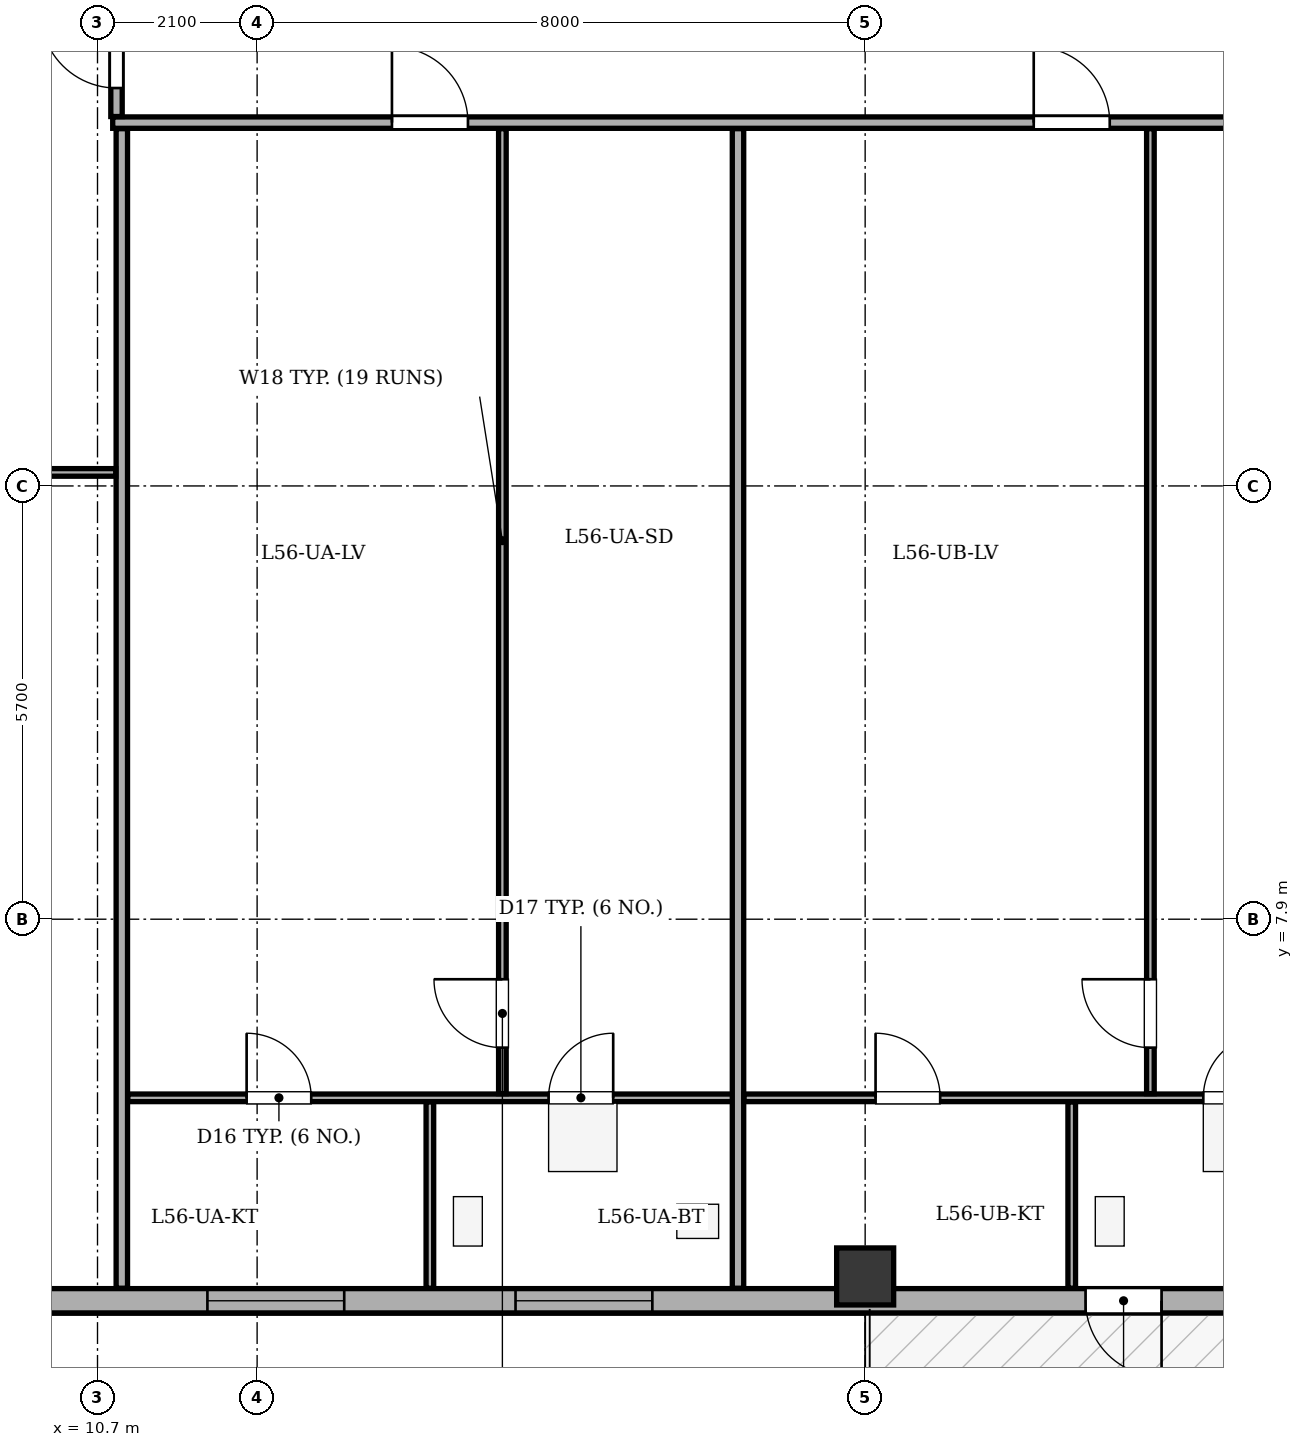
"""IFC4 building model, lengths in metres.
Left out: names, types, materials, properties, quantities, classifications, styles, units other than length and angle.
Written with IfcOpenShell. Run it as: python <this file> out.ifc"""

import sys

from ifc_helpers import new_model, si_unit, direction, frame, frame_2d, origin, origin_2d, place, context, subcontext, project, spatial, rectangle, extrude, element, fill, save


model = new_model("IFC4")
c1 = context("Model", 3, precision=1e-05, world=origin(), true_north=direction((0.0, 1.0)))
c2 = subcontext(c1, "Body", "Model", "MODEL_VIEW")
j1 = project(units=[si_unit("LENGTHUNIT", "METRE"), si_unit("PLANEANGLEUNIT", "RADIAN")], contexts=[c1])
p1 = place(None, origin())
s1 = spatial("IfcSite", under=j1, at=p1, CompositionType="ELEMENT")
p2 = place(p1, origin())
s2 = spatial("IfcBuilding", under=s1, at=p2, CompositionType="ELEMENT")
p3 = place(p2, frame((0.0, 0.0, 217.7)))
s3 = spatial("IfcBuildingStorey", under=s2, at=p3, CompositionType="ELEMENT", Elevation=217.7)
p4 = place(p3, frame((20.8, 3.2, 0.0), z_axis=(0.0, 0.0, 1.0), x_axis=(1.0, 0.0, 0.0)))
e1 = element("IfcColumn", 1, at=p4, inside=s3, PredefinedType="COLUMN", context=c2, shape_type="SweptSolid", body=[
    extrude(rectangle(XDim=0.75, YDim=0.75, at=origin_2d()), origin(), (0.0, 0.0, 1.0), 3.4),
])
p5 = place(p3, frame((44.8, 2.88, 0.0), z_axis=(0.0, 0.0, 1.0), x_axis=(-1.0, 0.0, 0.0)))
e2 = element("IfcWall", 2, at=p5, inside=s3, PredefinedType="STANDARD", context=c2, shape_type="SweptSolid", body=[
    extrude(rectangle(XDim=36.0, YDim=0.32, at=frame_2d((18.0, 0.0))), origin(), (0.0, 0.0, 1.0), 2.725),
])
p6 = place(p5, frame((20.1, 0.0, 0.0)))
e3 = element("IfcOpeningElement", 3, at=p6, cuts=e2, PredefinedType="OPENING", context=c2, shape_type="SweptSolid", body=[
    extrude(rectangle(XDim=1.0, YDim=2.02, at=frame_2d((0.5, 1.01))), frame((0.0, 0.17, 0.0), z_axis=(0.0, -1.0, 0.0), x_axis=(1.0, 0.0, 0.0)), (0.0, 0.0, 1.0), 0.34),
])
p7 = place(p5, frame((1.227, 0.0, 0.75)))
e4 = element("IfcOpeningElement", 4, at=p7, cuts=e2, PredefinedType="OPENING", context=c2, shape_type="SweptSolid", body=[
    extrude(rectangle(XDim=1.8, YDim=1.7, at=frame_2d((0.9, 0.85))), frame((0.0, 0.17, 0.0), z_axis=(0.0, -1.0, 0.0), x_axis=(1.0, 0.0, 0.0)), (0.0, 0.0, 1.0), 0.34),
])
p8 = place(p5, frame((5.18, 0.0, 0.75)))
e5 = element("IfcOpeningElement", 5, at=p8, cuts=e2, PredefinedType="OPENING", context=c2, shape_type="SweptSolid", body=[
    extrude(rectangle(XDim=1.8, YDim=1.7, at=frame_2d((0.9, 0.85))), frame((0.0, 0.17, 0.0), z_axis=(0.0, -1.0, 0.0), x_axis=(1.0, 0.0, 0.0)), (0.0, 0.0, 1.0), 0.34),
])
p9 = place(p5, frame((12.548, 0.0, 0.75)))
e6 = element("IfcOpeningElement", 6, at=p9, cuts=e2, PredefinedType="OPENING", context=c2, shape_type="SweptSolid", body=[
    extrude(rectangle(XDim=1.25, YDim=1.7, at=frame_2d((0.625, 0.85))), frame((0.0, 0.17, 0.0), z_axis=(0.0, -1.0, 0.0), x_axis=(1.0, 0.0, 0.0)), (0.0, 0.0, 1.0), 0.34),
])
p10 = place(p5, frame((26.8, 0.0, 0.75)))
e7 = element("IfcOpeningElement", 7, at=p10, cuts=e2, PredefinedType="OPENING", context=c2, shape_type="SweptSolid", body=[
    extrude(rectangle(XDim=1.8, YDim=1.7, at=frame_2d((0.9, 0.85))), frame((0.0, 0.17, 0.0), z_axis=(0.0, -1.0, 0.0), x_axis=(1.0, 0.0, 0.0)), (0.0, 0.0, 1.0), 0.34),
])
p11 = place(p5, frame((30.854, 0.0, 0.75)))
e8 = element("IfcOpeningElement", 8, at=p11, cuts=e2, PredefinedType="OPENING", context=c2, shape_type="SweptSolid", body=[
    extrude(rectangle(XDim=1.8, YDim=1.7, at=frame_2d((0.9, 0.85))), frame((0.0, 0.17, 0.0), z_axis=(0.0, -1.0, 0.0), x_axis=(1.0, 0.0, 0.0)), (0.0, 0.0, 1.0), 0.34),
])
p12 = place(p5, frame((10.33, 0.0, 0.75)))
e9 = element("IfcOpeningElement", 9, at=p12, cuts=e2, PredefinedType="OPENING", context=c2, shape_type="SweptSolid", body=[
    extrude(rectangle(XDim=0.75, YDim=1.45, at=frame_2d((0.375, 0.725))), frame((0.0, 0.17, 0.0), z_axis=(0.0, -1.0, 0.0), x_axis=(1.0, 0.0, 0.0)), (0.0, 0.0, 1.0), 0.34),
])
p13 = place(p3, frame((10.9, 18.38, 0.0), z_axis=(0.0, 0.0, 1.0), x_axis=(1.0, 0.0, 0.0)))
e10 = element("IfcWall", 10, at=p13, inside=s3, PredefinedType="PARTITIONING", context=c2, shape_type="SweptSolid", body=[
    extrude(rectangle(XDim=34.02, YDim=0.15, at=frame_2d((17.01, 0.0))), origin(), (0.0, 0.0, 1.0), 3.1),
])
p14 = place(p13, frame((3.674, 0.0, 0.0)))
e11 = element("IfcOpeningElement", 11, at=p14, cuts=e10, PredefinedType="OPENING", context=c2, shape_type="SweptSolid", body=[
    extrude(rectangle(XDim=1.0, YDim=2.1, at=frame_2d((0.5, 1.05))), frame((0.0, 0.085, 0.0), z_axis=(0.0, -1.0, 0.0), x_axis=(1.0, 0.0, 0.0)), (0.0, 0.0, 1.0), 0.17),
])
p15 = place(p13, frame((12.118, 0.0, 0.0)))
e12 = element("IfcOpeningElement", 12, at=p15, cuts=e10, PredefinedType="OPENING", context=c2, shape_type="SweptSolid", body=[
    extrude(rectangle(XDim=1.0, YDim=2.1, at=frame_2d((0.5, 1.05))), frame((0.0, 0.085, 0.0), z_axis=(0.0, -1.0, 0.0), x_axis=(1.0, 0.0, 0.0)), (0.0, 0.0, 1.0), 0.17),
])
p16 = place(p13, frame((20.901, 0.0, 0.0)))
e13 = element("IfcOpeningElement", 13, at=p16, cuts=e10, PredefinedType="OPENING", context=c2, shape_type="SweptSolid", body=[
    extrude(rectangle(XDim=1.0, YDim=2.1, at=frame_2d((0.5, 1.05))), frame((0.0, 0.085, 0.0), z_axis=(0.0, -1.0, 0.0), x_axis=(1.0, 0.0, 0.0)), (0.0, 0.0, 1.0), 0.17),
])
p17 = place(p13, frame((29.346, 0.0, 0.0)))
e14 = element("IfcOpeningElement", 14, at=p17, cuts=e10, PredefinedType="OPENING", context=c2, shape_type="SweptSolid", body=[
    extrude(rectangle(XDim=1.0, YDim=2.1, at=frame_2d((0.5, 1.05))), frame((0.0, 0.085, 0.0), z_axis=(0.0, -1.0, 0.0), x_axis=(1.0, 0.0, 0.0)), (0.0, 0.0, 1.0), 0.17),
])
p18 = place(p3, frame((11.02, 3.045, 0.0), z_axis=(0.0, 0.0, 1.0), x_axis=(0.0, 1.0, 0.0)))
e15 = element("IfcWall", 15, at=p18, inside=s3, PredefinedType="PARTITIONING", context=c2, shape_type="SweptSolid", body=[
    extrude(rectangle(XDim=15.255, YDim=0.15, at=frame_2d((7.627, 0.0))), origin(), (0.0, 0.0, 1.0), 3.1),
])
p19 = place(p3, frame((11.1, 5.55, 0.0), z_axis=(0.0, 0.0, 1.0), x_axis=(1.0, 0.0, 0.0)))
e16 = element("IfcWall", 16, at=p19, inside=s3, PredefinedType="PARTITIONING", context=c2, shape_type="SweptSolid", body=[
    extrude(rectangle(XDim=8.067, YDim=0.1, at=frame_2d((4.033, 0.0))), origin(), (0.0, 0.0, 1.0), 3.1),
])
p20 = place(p19, frame((1.562, 0.0, 0.0)))
e17 = element("IfcOpeningElement", 17, at=p20, cuts=e16, PredefinedType="OPENING", context=c2, shape_type="SweptSolid", body=[
    extrude(rectangle(XDim=0.85, YDim=2.05, at=frame_2d((0.425, 1.025))), frame((0.0, 0.06, 0.0), z_axis=(0.0, -1.0, 0.0), x_axis=(1.0, 0.0, 0.0)), (0.0, 0.0, 1.0), 0.12),
])
p21 = place(p19, frame((5.535, 0.0, 0.0)))
e18 = element("IfcOpeningElement", 18, at=p21, cuts=e16, PredefinedType="OPENING", context=c2, shape_type="SweptSolid", body=[
    extrude(rectangle(XDim=0.85, YDim=2.05, at=frame_2d((0.425, 1.025))), frame((0.0, 0.06, 0.0), z_axis=(0.0, -1.0, 0.0), x_axis=(1.0, 0.0, 0.0)), (0.0, 0.0, 1.0), 0.12),
])
p22 = place(p3, frame((16.027, 5.605, 0.0), z_axis=(0.0, 0.0, 1.0), x_axis=(0.0, 1.0, 0.0)))
e19 = element("IfcWall", 19, at=p22, inside=s3, PredefinedType="PARTITIONING", context=c2, shape_type="SweptSolid", body=[
    extrude(rectangle(XDim=12.695, YDim=0.1, at=frame_2d((6.348, 0.0))), origin(), (0.0, 0.0, 1.0), 3.1),
])
p23 = place(p22, frame((0.605, 0.0, 0.0)))
e20 = element("IfcOpeningElement", 20, at=p23, cuts=e19, PredefinedType="OPENING", context=c2, shape_type="SweptSolid", body=[
    extrude(rectangle(XDim=0.9, YDim=2.05, at=frame_2d((0.45, 1.025))), frame((0.0, 0.06, 0.0), z_axis=(0.0, -1.0, 0.0), x_axis=(1.0, 0.0, 0.0)), (0.0, 0.0, 1.0), 0.12),
])
p24 = place(p3, frame((15.073, 3.045, 0.0), z_axis=(0.0, 0.0, 1.0), x_axis=(0.0, 1.0, 0.0)))
e21 = element("IfcWall", 21, at=p24, inside=s3, PredefinedType="PARTITIONING", context=c2, shape_type="SweptSolid", body=[
    extrude(rectangle(XDim=2.45, YDim=0.1, at=frame_2d((1.225, 0.0))), origin(), (0.0, 0.0, 1.0), 3.1),
])
p25 = place(p3, frame((19.127, 3.045, 0.0), z_axis=(0.0, 0.0, 1.0), x_axis=(0.0, 1.0, 0.0)))
e22 = element("IfcWall", 22, at=p25, inside=s3, PredefinedType="PARTITIONING", context=c2, shape_type="SweptSolid", body=[
    extrude(rectangle(XDim=15.255, YDim=0.15, at=frame_2d((7.627, 0.0))), origin(), (0.0, 0.0, 1.0), 3.1),
])
p26 = place(p3, frame((19.207, 5.55, 0.0), z_axis=(0.0, 0.0, 1.0), x_axis=(1.0, 0.0, 0.0)))
e23 = element("IfcWall", 23, at=p26, inside=s3, PredefinedType="PARTITIONING", context=c2, shape_type="SweptSolid", body=[
    extrude(rectangle(XDim=8.743, YDim=0.1, at=frame_2d((4.372, 0.0))), origin(), (0.0, 0.0, 1.0), 3.1),
])
p27 = place(p26, frame((1.73, 0.0, 0.0)))
e24 = element("IfcOpeningElement", 24, at=p27, cuts=e23, PredefinedType="OPENING", context=c2, shape_type="SweptSolid", body=[
    extrude(rectangle(XDim=0.85, YDim=2.05, at=frame_2d((0.425, 1.025))), frame((0.0, 0.06, 0.0), z_axis=(0.0, -1.0, 0.0), x_axis=(1.0, 0.0, 0.0)), (0.0, 0.0, 1.0), 0.12),
])
p28 = place(p26, frame((6.042, 0.0, 0.0)))
e25 = element("IfcOpeningElement", 25, at=p28, cuts=e23, PredefinedType="OPENING", context=c2, shape_type="SweptSolid", body=[
    extrude(rectangle(XDim=0.85, YDim=2.05, at=frame_2d((0.425, 1.025))), frame((0.0, 0.06, 0.0), z_axis=(0.0, -1.0, 0.0), x_axis=(1.0, 0.0, 0.0)), (0.0, 0.0, 1.0), 0.12),
])
p29 = place(p3, frame((24.553, 5.605, 0.0), z_axis=(0.0, 0.0, 1.0), x_axis=(0.0, 1.0, 0.0)))
e26 = element("IfcWall", 26, at=p29, inside=s3, PredefinedType="PARTITIONING", context=c2, shape_type="SweptSolid", body=[
    extrude(rectangle(XDim=12.695, YDim=0.1, at=frame_2d((6.348, 0.0))), origin(), (0.0, 0.0, 1.0), 3.1),
])
p30 = place(p29, frame((0.605, 0.0, 0.0)))
e27 = element("IfcOpeningElement", 27, at=p30, cuts=e26, PredefinedType="OPENING", context=c2, shape_type="SweptSolid", body=[
    extrude(rectangle(XDim=0.9, YDim=2.05, at=frame_2d((0.45, 1.025))), frame((0.0, 0.06, 0.0), z_axis=(0.0, -1.0, 0.0), x_axis=(1.0, 0.0, 0.0)), (0.0, 0.0, 1.0), 0.12),
])
p31 = place(p3, frame((23.518, 3.045, 0.0), z_axis=(0.0, 0.0, 1.0), x_axis=(0.0, 1.0, 0.0)))
e28 = element("IfcWall", 28, at=p31, inside=s3, PredefinedType="PARTITIONING", context=c2, shape_type="SweptSolid", body=[
    extrude(rectangle(XDim=2.45, YDim=0.1, at=frame_2d((1.225, 0.0))), origin(), (0.0, 0.0, 1.0), 3.1),
])
p32 = place(p3, frame((10.95, 18.46, 0.0), z_axis=(0.0, 0.0, 1.0), x_axis=(0.0, 1.0, 0.0)))
e29 = element("IfcWall", 29, at=p32, inside=s3, PredefinedType="PARTITIONING", context=c2, shape_type="SweptSolid", body=[
    extrude(rectangle(XDim=1.79, YDim=0.15, at=frame_2d((0.895, 0.0))), origin(), (0.0, 0.0, 1.0), 3.1),
])
p33 = place(p32, frame((0.375, 0.0, 0.0)))
e30 = element("IfcOpeningElement", 30, at=p33, cuts=e29, PredefinedType="OPENING", context=c2, shape_type="SweptSolid", body=[
    extrude(rectangle(XDim=1.0, YDim=2.1, at=frame_2d((0.5, 1.05))), frame((0.0, 0.085, 0.0), z_axis=(0.0, -1.0, 0.0), x_axis=(1.0, 0.0, 0.0)), (0.0, 0.0, 1.0), 0.17),
])
p34 = place(p3, frame((4.645, 13.778, 0.0), z_axis=(0.0, 0.0, 1.0), x_axis=(1.0, 0.0, 0.0)))
e31 = element("IfcWall", 31, at=p34, inside=s3, PredefinedType="PARTITIONING", context=c2, shape_type="SweptSolid", body=[
    extrude(rectangle(XDim=6.295, YDim=0.1, at=frame_2d((3.147, 0.0))), origin(), (0.0, 0.0, 1.0), 3.1),
])
p35 = place(p34, frame((2.696, 0.0, 0.0)))
e32 = element("IfcOpeningElement", 32, at=p35, cuts=e31, PredefinedType="OPENING", context=c2, shape_type="SweptSolid", body=[
    extrude(rectangle(XDim=0.9, YDim=2.05, at=frame_2d((0.45, 1.025))), frame((0.0, 0.06, 0.0), z_axis=(0.0, -1.0, 0.0), x_axis=(1.0, 0.0, 0.0)), (0.0, 0.0, 1.0), 0.12),
])
p36 = place(p6, origin())
e33 = element("IfcDoor", 33, at=p36, inside=s3, OperationType="SINGLE_SWING_LEFT", PredefinedType="DOOR", context=c2, shape_type="SweptSolid", body=[
    extrude(rectangle(XDim=1.0, YDim=2.02, at=frame_2d((0.5, 1.01))), frame((0.0, 0.025, 0.0), z_axis=(0.0, -1.0, 0.0), x_axis=(1.0, 0.0, 0.0)), (0.0, 0.0, 1.0), 0.05),
])
fill(e3, e33)
p37 = place(p10, origin())
e34 = element("IfcWindow", 34, at=p37, inside=s3, PartitioningType="SINGLE_PANEL", PredefinedType="WINDOW", context=c2, shape_type="SweptSolid", body=[
    extrude(rectangle(XDim=1.8, YDim=1.7, at=frame_2d((0.9, 0.85))), frame((0.0, -0.01, 0.0), z_axis=(0.0, -1.0, 0.0), x_axis=(1.0, 0.0, 0.0)), (0.0, 0.0, 1.0), 0.06),
])
fill(e7, e34)
p38 = place(p11, origin())
e35 = element("IfcWindow", 35, at=p38, inside=s3, PartitioningType="SINGLE_PANEL", PredefinedType="WINDOW", context=c2, shape_type="SweptSolid", body=[
    extrude(rectangle(XDim=1.8, YDim=1.7, at=frame_2d((0.9, 0.85))), frame((0.0, -0.01, 0.0), z_axis=(0.0, -1.0, 0.0), x_axis=(1.0, 0.0, 0.0)), (0.0, 0.0, 1.0), 0.06),
])
fill(e8, e35)
p39 = place(p14, origin())
e36 = element("IfcDoor", 36, at=p39, inside=s3, OperationType="SINGLE_SWING_LEFT", PredefinedType="DOOR", context=c2, shape_type="SweptSolid", body=[
    extrude(rectangle(XDim=1.0, YDim=2.1, at=frame_2d((0.5, 1.05))), frame((0.0, 0.025, 0.0), z_axis=(0.0, -1.0, 0.0), x_axis=(1.0, 0.0, 0.0)), (0.0, 0.0, 1.0), 0.05),
])
fill(e11, e36)
p40 = place(p15, origin())
e37 = element("IfcDoor", 37, at=p40, inside=s3, OperationType="SINGLE_SWING_LEFT", PredefinedType="DOOR", context=c2, shape_type="SweptSolid", body=[
    extrude(rectangle(XDim=1.0, YDim=2.1, at=frame_2d((0.5, 1.05))), frame((0.0, 0.025, 0.0), z_axis=(0.0, -1.0, 0.0), x_axis=(1.0, 0.0, 0.0)), (0.0, 0.0, 1.0), 0.05),
])
fill(e12, e37)
p41 = place(p23, origin())
e38 = element("IfcDoor", 38, at=p41, inside=s3, OperationType="SINGLE_SWING_RIGHT", PredefinedType="DOOR", context=c2, shape_type="SweptSolid", body=[
    extrude(rectangle(XDim=0.9, YDim=2.05, at=frame_2d((0.45, 1.025))), frame((0.0, 0.025, 0.0), z_axis=(0.0, -1.0, 0.0), x_axis=(1.0, 0.0, 0.0)), (0.0, 0.0, 1.0), 0.05),
])
fill(e20, e38)
p42 = place(p20, origin())
e39 = element("IfcDoor", 39, at=p42, inside=s3, OperationType="SINGLE_SWING_LEFT", PredefinedType="DOOR", context=c2, shape_type="SweptSolid", body=[
    extrude(rectangle(XDim=0.85, YDim=2.05, at=frame_2d((0.425, 1.025))), frame((0.0, 0.025, 0.0), z_axis=(0.0, -1.0, 0.0), x_axis=(1.0, 0.0, 0.0)), (0.0, 0.0, 1.0), 0.05),
])
fill(e17, e39)
p43 = place(p21, origin())
e40 = element("IfcDoor", 40, at=p43, inside=s3, OperationType="SINGLE_SWING_RIGHT", PredefinedType="DOOR", context=c2, shape_type="SweptSolid", body=[
    extrude(rectangle(XDim=0.85, YDim=2.05, at=frame_2d((0.425, 1.025))), frame((0.0, 0.025, 0.0), z_axis=(0.0, -1.0, 0.0), x_axis=(1.0, 0.0, 0.0)), (0.0, 0.0, 1.0), 0.05),
])
fill(e18, e40)
p44 = place(p30, origin())
e41 = element("IfcDoor", 41, at=p44, inside=s3, OperationType="SINGLE_SWING_RIGHT", PredefinedType="DOOR", context=c2, shape_type="SweptSolid", body=[
    extrude(rectangle(XDim=0.9, YDim=2.05, at=frame_2d((0.45, 1.025))), frame((0.0, 0.025, 0.0), z_axis=(0.0, -1.0, 0.0), x_axis=(1.0, 0.0, 0.0)), (0.0, 0.0, 1.0), 0.05),
])
fill(e27, e41)
p45 = place(p27, origin())
e42 = element("IfcDoor", 42, at=p45, inside=s3, OperationType="SINGLE_SWING_LEFT", PredefinedType="DOOR", context=c2, shape_type="SweptSolid", body=[
    extrude(rectangle(XDim=0.85, YDim=2.05, at=frame_2d((0.425, 1.025))), frame((0.0, 0.025, 0.0), z_axis=(0.0, -1.0, 0.0), x_axis=(1.0, 0.0, 0.0)), (0.0, 0.0, 1.0), 0.05),
])
fill(e24, e42)
p46 = place(p28, origin())
e43 = element("IfcDoor", 43, at=p46, inside=s3, OperationType="SINGLE_SWING_RIGHT", PredefinedType="DOOR", context=c2, shape_type="SweptSolid", body=[
    extrude(rectangle(XDim=0.85, YDim=2.05, at=frame_2d((0.425, 1.025))), frame((0.0, 0.025, 0.0), z_axis=(0.0, -1.0, 0.0), x_axis=(1.0, 0.0, 0.0)), (0.0, 0.0, 1.0), 0.05),
])
fill(e25, e43)
p47 = place(p33, origin())
e44 = element("IfcDoor", 44, at=p47, inside=s3, OperationType="SINGLE_SWING_RIGHT", PredefinedType="DOOR", context=c2, shape_type="SweptSolid", body=[
    extrude(rectangle(XDim=1.0, YDim=2.1, at=frame_2d((0.5, 1.05))), frame((0.0, 0.025, 0.0), z_axis=(0.0, -1.0, 0.0), x_axis=(1.0, 0.0, 0.0)), (0.0, 0.0, 1.0), 0.05),
])
fill(e30, e44)
save(model, sys.argv[1])
